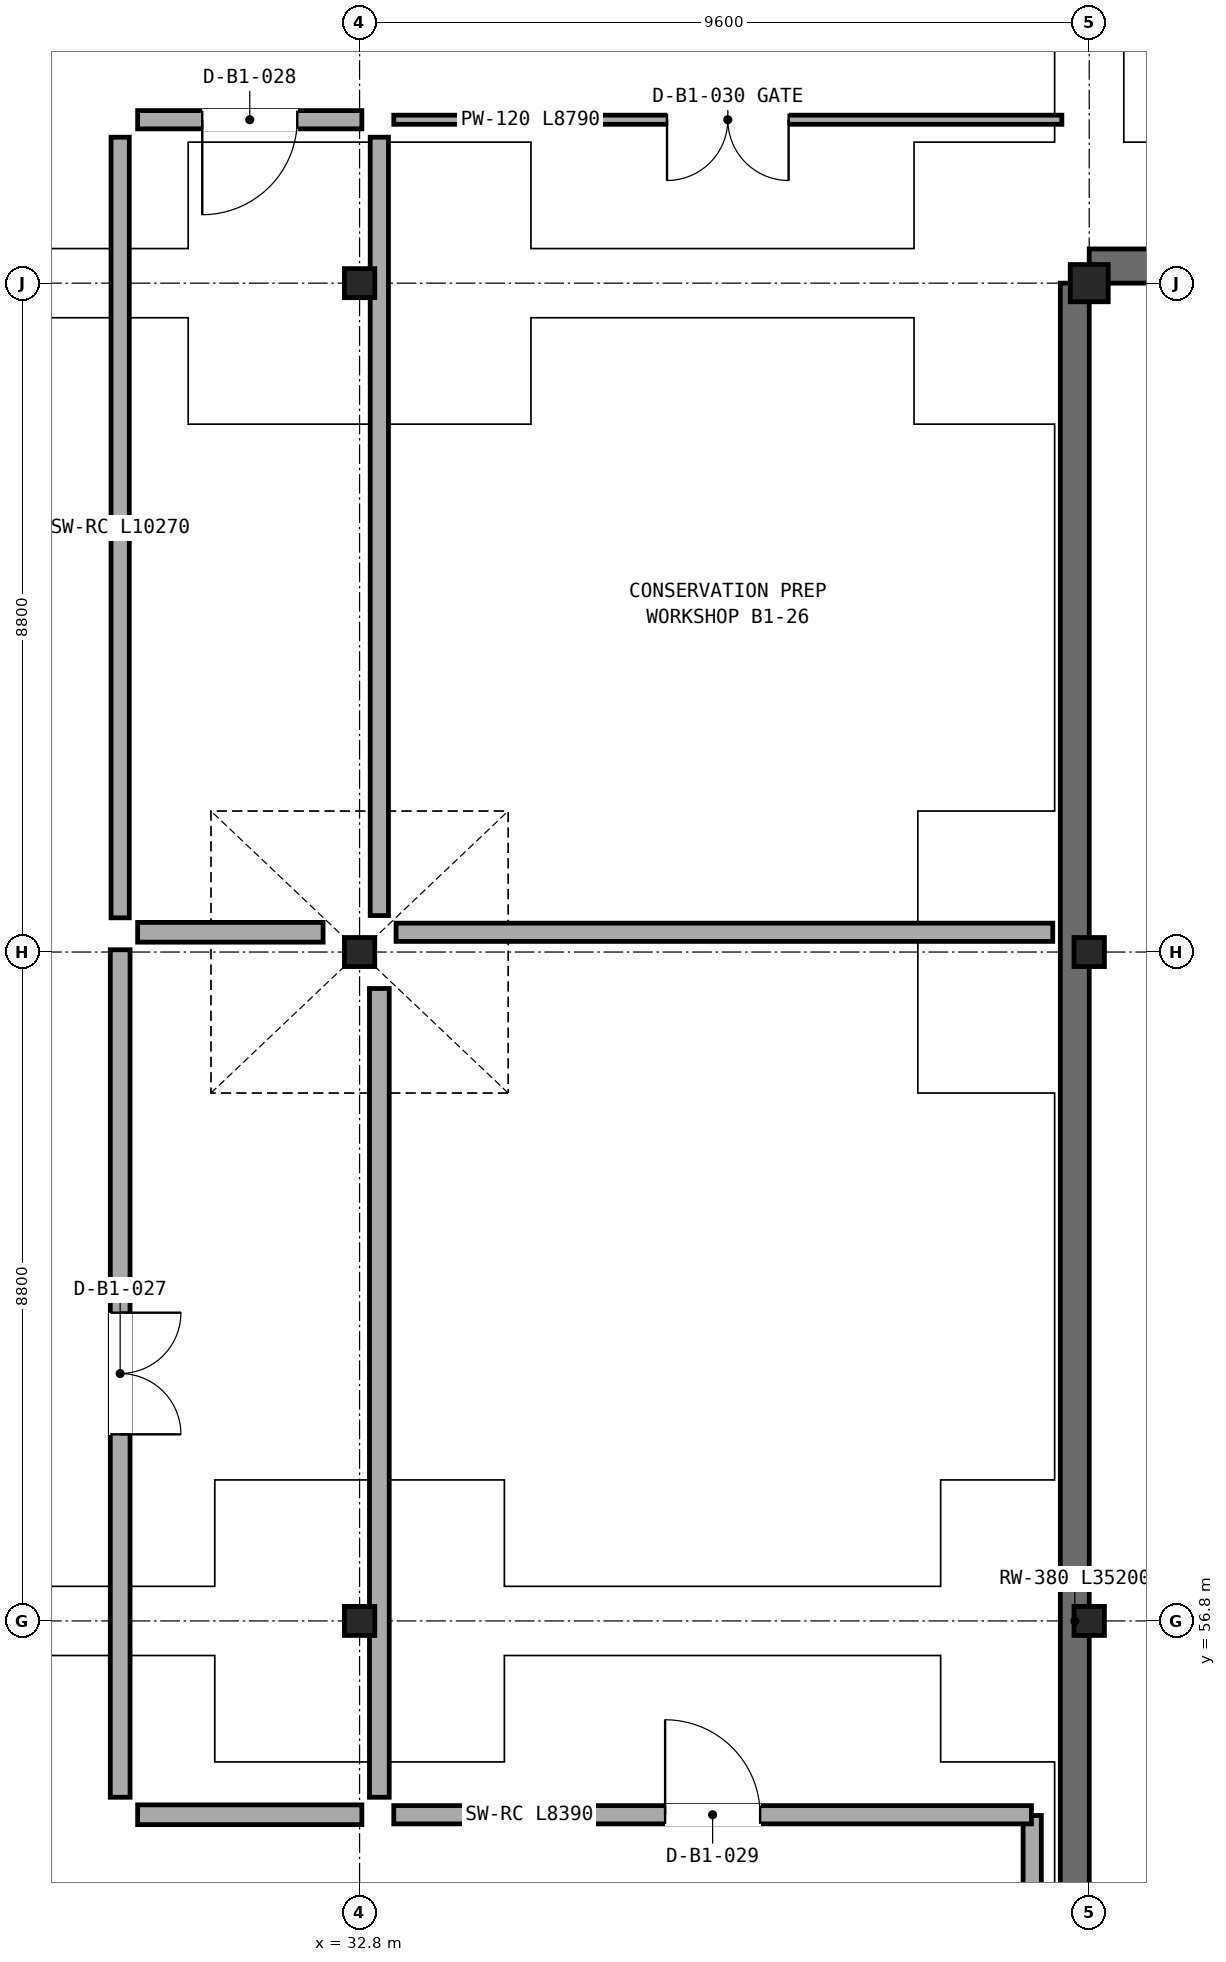
"""IFC4 building model, lengths in metres.
Left out: names, types, materials, properties, quantities, classifications, styles, units other than length and angle.
Written with IfcOpenShell. Run it as: python <this file> out.ifc"""

import sys

from ifc_helpers import new_model, si_unit, direction, frame, frame_2d, origin, origin_2d, place, context, subcontext, project, spatial, rectangle, i_section, extrude, element, fill, save


model = new_model("IFC4")
c1 = context("Model", 3, precision=1e-05, world=origin(), true_north=direction((0.0, 1.0)))
c2 = subcontext(c1, "Body", "Model", "MODEL_VIEW")
j1 = project(units=[si_unit("LENGTHUNIT", "METRE"), si_unit("PLANEANGLEUNIT", "RADIAN")], contexts=[c1])
p1 = place(None, origin())
s1 = spatial("IfcSite", under=j1, at=p1, CompositionType="ELEMENT")
p2 = place(p1, origin())
s2 = spatial("IfcBuilding", under=s1, at=p2, CompositionType="ELEMENT")
p3 = place(p2, frame((0.0, 0.0, -5.4)))
s3 = spatial("IfcBuildingStorey", under=s2, at=p3, CompositionType="ELEMENT", Elevation=-5.4)
for number, where, z_axis, x_axis in (
    (1, (32.8, 56.8, 0.0), (0.0, 0.0, 1.0), (1.0, 0.0, 0.0)),
    (2, (32.8, 65.6, 0.0), (0.0, 0.0, 1.0), (1.0, 0.0, 0.0)),
    (3, (32.8, 74.4, 0.0), (0.0, 0.0, 1.0), (1.0, 0.0, 0.0)),
    (4, (42.4, 56.8, 0.0), (0.0, 0.0, 1.0), (1.0, 0.0, 0.0)),
    (5, (42.4, 65.6, 0.0), (0.0, 0.0, 1.0), (1.0, 0.0, 0.0)),
):
    element("IfcColumn", number, at=place(p3, frame(where, z_axis=z_axis, x_axis=x_axis)), inside=s3, PredefinedType="COLUMN", context=c2, shape_type="SweptSolid", body=[
        extrude(i_section(OverallWidth=0.4, OverallDepth=0.382, WebThickness=0.025, FlangeThickness=0.036, at=origin_2d()), origin(), (0.0, 0.0, 1.0), 5.4),
    ])
p4 = place(p3, frame((42.4, 74.4, 0.0), z_axis=(0.0, 0.0, 1.0), x_axis=(1.0, 0.0, 0.0)))
e6 = element("IfcColumn", 6, at=p4, inside=s3, PredefinedType="COLUMN", context=c2, shape_type="SweptSolid", body=[
    extrude(i_section(OverallWidth=0.5, OverallDepth=0.49, WebThickness=0.028, FlangeThickness=0.04, at=origin_2d()), origin(), (0.0, 0.0, 1.0), 5.4),
])
p5 = place(p3, frame((42.21, 39.2, 0.0), z_axis=(0.0, 0.0, 1.0), x_axis=(0.0, 1.0, 0.0)))
e7 = element("IfcWall", 7, at=p5, inside=s3, PredefinedType="USERDEFINED", context=c2, shape_type="SweptSolid", body=[
    extrude(rectangle(XDim=35.2, YDim=0.38, at=frame_2d((17.6, 0.0))), origin(), (0.0, 0.0, 1.0), 5.06),
])
p6 = place(p3, frame((42.4, 74.625, 0.0), z_axis=(0.0, 0.0, 1.0), x_axis=(1.0, 0.0, 0.0)))
e8 = element("IfcWall", 8, at=p6, inside=s3, PredefinedType="USERDEFINED", context=c2, shape_type="SweptSolid", body=[
    extrude(rectangle(XDim=38.4, YDim=0.45, at=frame_2d((19.2, 0.0))), origin(), (0.0, 0.0, 1.0), 5.06),
])
p7 = place(p3, frame((29.65, 54.48, 0.0), z_axis=(0.0, 0.0, 1.0), x_axis=(0.0, 1.0, 0.0)))
e9 = element("IfcWall", 9, at=p7, inside=s3, PredefinedType="SOLIDWALL", context=c2, shape_type="SweptSolid", body=[
    extrude(rectangle(XDim=11.15, YDim=0.26, at=frame_2d((5.575, 0.0))), origin(), (0.0, 0.0, 1.0), 4.458),
])
p8 = place(p7, frame((4.775, 0.0, 0.0)))
e10 = element("IfcOpeningElement", 10, at=p8, cuts=e9, PredefinedType="OPENING", context=c2, shape_type="SweptSolid", body=[
    extrude(rectangle(XDim=1.6, YDim=2.4, at=frame_2d((0.8, 1.2))), frame((0.0, 0.14, 0.0), z_axis=(0.0, -1.0, 0.0), x_axis=(1.0, 0.0, 0.0)), (0.0, 0.0, 1.0), 0.28),
])
p9 = place(p3, frame((32.83, 54.25, 0.0), z_axis=(0.0, 0.0, 1.0), x_axis=(-1.0, 0.0, 0.0)))
e11 = element("IfcWall", 11, at=p9, inside=s3, PredefinedType="SOLIDWALL", context=c2, shape_type="SweptSolid", body=[
    extrude(rectangle(XDim=2.95, YDim=0.26, at=frame_2d((1.475, 0.0))), origin(), (0.0, 0.0, 1.0), 4.537),
])
p10 = place(p3, frame((29.88, 76.55, 0.0), z_axis=(0.0, 0.0, 1.0), x_axis=(1.0, 0.0, 0.0)))
e12 = element("IfcWall", 12, at=p10, inside=s3, PredefinedType="SOLIDWALL", context=c2, shape_type="SweptSolid", body=[
    extrude(rectangle(XDim=2.95, YDim=0.24, at=frame_2d((1.475, 0.0))), origin(), (0.0, 0.0, 1.0), 4.537),
])
p11 = place(p10, frame((0.85, 0.0, 0.0)))
e13 = element("IfcOpeningElement", 13, at=p11, cuts=e12, PredefinedType="OPENING", context=c2, shape_type="SweptSolid", body=[
    extrude(rectangle(XDim=1.25, YDim=2.2, at=frame_2d((0.625, 1.1))), frame((0.0, 0.13, 0.0), z_axis=(0.0, -1.0, 0.0), x_axis=(1.0, 0.0, 0.0)), (0.0, 0.0, 1.0), 0.26),
])
p12 = place(p3, frame((29.65, 66.05, 0.0), z_axis=(0.0, 0.0, 1.0), x_axis=(0.0, 1.0, 0.0)))
e14 = element("IfcWall", 14, at=p12, inside=s3, PredefinedType="SOLIDWALL", context=c2, shape_type="SweptSolid", body=[
    extrude(rectangle(XDim=10.27, YDim=0.24, at=frame_2d((5.135, 0.0))), origin(), (0.0, 0.0, 1.0), 4.458),
])
p13 = place(p3, frame((41.65, 51.16, 0.0), z_axis=(0.0, 0.0, 1.0), x_axis=(0.0, 1.0, 0.0)))
e15 = element("IfcWall", 15, at=p13, inside=s3, PredefinedType="SOLIDWALL", context=c2, shape_type="SweptSolid", body=[
    extrude(rectangle(XDim=3.08, YDim=0.24, at=frame_2d((1.54, 0.0))), origin(), (0.0, 0.0, 1.0), 5.03),
])
p14 = place(p3, frame((41.64, 54.25, 0.0), z_axis=(0.0, 0.0, 1.0), x_axis=(-1.0, 0.0, 0.0)))
e16 = element("IfcWall", 16, at=p14, inside=s3, PredefinedType="SOLIDWALL", context=c2, shape_type="SweptSolid", body=[
    extrude(rectangle(XDim=8.39, YDim=0.24, at=frame_2d((4.195, 0.0))), origin(), (0.0, 0.0, 1.0), 4.814),
])
p15 = place(p14, frame((3.57, 0.0, 0.0)))
e17 = element("IfcOpeningElement", 17, at=p15, cuts=e16, PredefinedType="OPENING", context=c2, shape_type="SweptSolid", body=[
    extrude(rectangle(XDim=1.25, YDim=2.2, at=frame_2d((0.625, 1.1))), frame((0.0, 0.13, 0.0), z_axis=(0.0, -1.0, 0.0), x_axis=(1.0, 0.0, 0.0)), (0.0, 0.0, 1.0), 0.26),
])
p16 = place(p3, frame((33.25, 76.55, 0.0), z_axis=(0.0, 0.0, 1.0), x_axis=(1.0, 0.0, 0.0)))
e18 = element("IfcWall", 18, at=p16, inside=s3, PredefinedType="PARTITIONING", context=c2, shape_type="SweptSolid", body=[
    extrude(rectangle(XDim=8.79, YDim=0.12, at=frame_2d((4.395, 0.0))), origin(), (0.0, 0.0, 1.0), 4.763),
])
p17 = place(p16, frame((3.595, 0.0, 0.0)))
e19 = element("IfcOpeningElement", 19, at=p17, cuts=e18, PredefinedType="OPENING", context=c2, shape_type="SweptSolid", body=[
    extrude(rectangle(XDim=1.6, YDim=2.1, at=frame_2d((0.8, 1.05))), frame((0.0, 0.07, 0.0), z_axis=(0.0, -1.0, 0.0), x_axis=(1.0, 0.0, 0.0)), (0.0, 0.0, 1.0), 0.14),
])
p18 = place(p3, frame((29.88, 65.86, 0.0), z_axis=(0.0, 0.0, 1.0), x_axis=(1.0, 0.0, 0.0)))
e20 = element("IfcWall", 20, at=p18, inside=s3, PredefinedType="SOLIDWALL", context=c2, shape_type="SweptSolid", body=[
    extrude(rectangle(XDim=2.44, YDim=0.26, at=frame_2d((1.22, 0.0))), origin(), (0.0, 0.0, 1.0), 4.458),
])
p19 = place(p3, frame((33.06, 65.12, 0.0), z_axis=(0.0, 0.0, 1.0), x_axis=(0.0, -1.0, 0.0)))
e21 = element("IfcWall", 21, at=p19, inside=s3, PredefinedType="SOLIDWALL", context=c2, shape_type="SweptSolid", body=[
    extrude(rectangle(XDim=10.64, YDim=0.26, at=frame_2d((5.32, 0.0))), origin(), (0.0, 0.0, 1.0), 4.458),
])
p20 = place(p3, frame((33.06, 76.32, 0.0), z_axis=(0.0, 0.0, 1.0), x_axis=(0.0, -1.0, 0.0)))
e22 = element("IfcWall", 22, at=p20, inside=s3, PredefinedType="SOLIDWALL", context=c2, shape_type="SweptSolid", body=[
    extrude(rectangle(XDim=10.24, YDim=0.24, at=frame_2d((5.12, 0.0))), origin(), (0.0, 0.0, 1.0), 4.458),
])
p21 = place(p3, frame((33.28, 65.86, 0.0), z_axis=(0.0, 0.0, 1.0), x_axis=(1.0, 0.0, 0.0)))
e23 = element("IfcWall", 23, at=p21, inside=s3, PredefinedType="SOLIDWALL", context=c2, shape_type="SweptSolid", body=[
    extrude(rectangle(XDim=8.64, YDim=0.24, at=frame_2d((4.32, 0.0))), origin(), (0.0, 0.0, 1.0), 4.458),
])
p22 = place(p8, frame((1.6, 0.0, 0.0), z_axis=(0.0, 0.0, 1.0), x_axis=(-1.0, 0.0, 0.0)))
e24 = element("IfcDoor", 24, at=p22, inside=s3, OperationType="DOUBLE_DOOR_SINGLE_SWING", PredefinedType="DOOR", context=c2, shape_type="SweptSolid", body=[
    extrude(rectangle(XDim=1.6, YDim=2.4, at=frame_2d((0.8, 1.2))), frame((0.0, 0.025, 0.0), z_axis=(0.0, -1.0, 0.0), x_axis=(1.0, 0.0, 0.0)), (0.0, 0.0, 1.0), 0.05),
])
fill(e10, e24)
p23 = place(p11, frame((1.25, 0.0, 0.0), z_axis=(0.0, 0.0, 1.0), x_axis=(-1.0, 0.0, 0.0)))
e25 = element("IfcDoor", 25, at=p23, inside=s3, OperationType="SINGLE_SWING_LEFT", PredefinedType="DOOR", context=c2, shape_type="SweptSolid", body=[
    extrude(rectangle(XDim=1.25, YDim=2.2, at=frame_2d((0.625, 1.1))), frame((0.0, 0.025, 0.0), z_axis=(0.0, -1.0, 0.0), x_axis=(1.0, 0.0, 0.0)), (0.0, 0.0, 1.0), 0.05),
])
fill(e13, e25)
p24 = place(p15, frame((1.25, 0.0, 0.0), z_axis=(0.0, 0.0, 1.0), x_axis=(-1.0, 0.0, 0.0)))
e26 = element("IfcDoor", 26, at=p24, inside=s3, OperationType="SINGLE_SWING_RIGHT", PredefinedType="DOOR", context=c2, shape_type="SweptSolid", body=[
    extrude(rectangle(XDim=1.25, YDim=2.2, at=frame_2d((0.625, 1.1))), frame((0.0, 0.025, 0.0), z_axis=(0.0, -1.0, 0.0), x_axis=(1.0, 0.0, 0.0)), (0.0, 0.0, 1.0), 0.05),
])
fill(e17, e26)
p25 = place(p17, frame((1.6, 0.0, 0.0), z_axis=(0.0, 0.0, 1.0), x_axis=(-1.0, 0.0, 0.0)))
e27 = element("IfcDoor", 27, at=p25, inside=s3, OperationType="DOUBLE_DOOR_SINGLE_SWING", PredefinedType="GATE", context=c2, shape_type="SweptSolid", body=[
    extrude(rectangle(XDim=1.6, YDim=2.1, at=frame_2d((0.8, 1.05))), frame((0.0, 0.025, 0.0), z_axis=(0.0, -1.0, 0.0), x_axis=(1.0, 0.0, 0.0)), (0.0, 0.0, 1.0), 0.05),
])
fill(e19, e27)
save(model, sys.argv[1])
